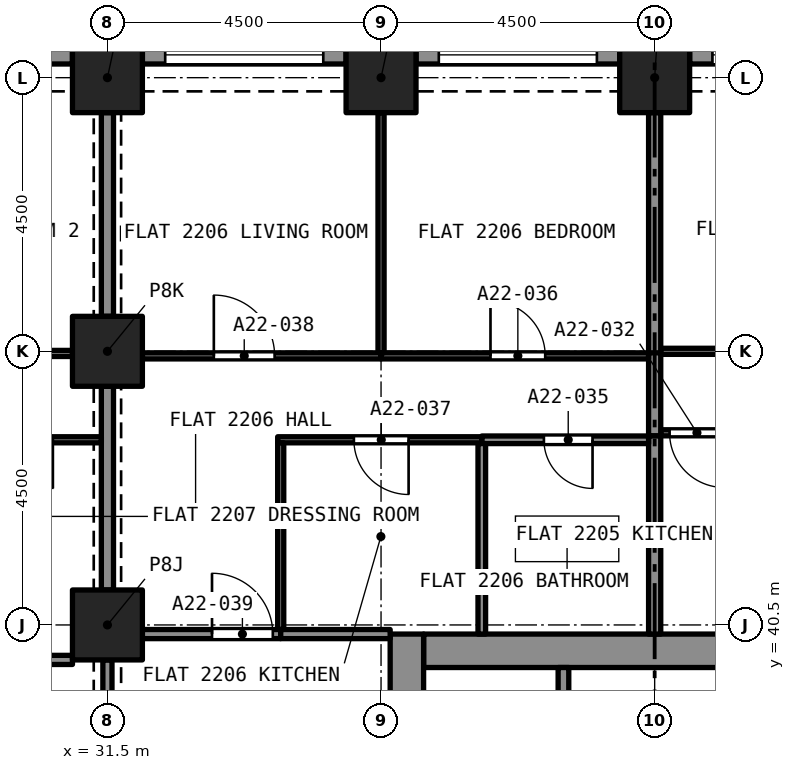
"""IFC4 building model, lengths in metres.
Left out: names, types, materials, properties, quantities, classifications, styles, units other than length and angle.
Written with IfcOpenShell. Run it as: python <this file> out.ifc"""

import sys

from ifc_helpers import new_model, si_unit, direction, frame, frame_2d, origin, origin_2d, place, context, subcontext, project, spatial, rectangle, extrude, element, fill, save


model = new_model("IFC4")
c1 = context("Model", 3, precision=1e-05, world=origin(), true_north=direction((0.0, 1.0)))
c2 = subcontext(c1, "Body", "Model", "MODEL_VIEW")
j1 = project(units=[si_unit("LENGTHUNIT", "METRE"), si_unit("PLANEANGLEUNIT", "RADIAN")], contexts=[c1])
p1 = place(None, origin())
s1 = spatial("IfcSite", under=j1, at=p1, CompositionType="ELEMENT")
p2 = place(p1, origin())
s2 = spatial("IfcBuilding", under=s1, at=p2, CompositionType="ELEMENT")
p3 = place(p2, frame((0.0, 0.0, 83.2)))
s3 = spatial("IfcBuildingStorey", under=s2, at=p3, CompositionType="ELEMENT", Elevation=83.2)
for number, where, z_axis, x_axis in (
    (1, (31.5, 40.5, 0.0), (0.0, 0.0, 1.0), (1.0, 0.0, 0.0)),
    (2, (31.5, 45.0, 0.0), (0.0, 0.0, 1.0), (1.0, 0.0, 0.0)),
    (3, (31.5, 49.5, 0.0), (0.0, 0.0, 1.0), (1.0, 0.0, 0.0)),
    (4, (36.0, 49.5, 0.0), (0.0, 0.0, 1.0), (1.0, 0.0, 0.0)),
    (5, (40.5, 49.5, 0.0), (0.0, 0.0, 1.0), (1.0, 0.0, 0.0)),
):
    element("IfcColumn", number, at=place(p3, frame(where, z_axis=z_axis, x_axis=x_axis)), inside=s3, PredefinedType="COLUMN", context=c2, shape_type="SweptSolid", body=[
        extrude(rectangle(XDim=1.15, YDim=1.15, at=origin_2d()), origin(), (0.0, 0.0, 1.0), 3.2),
    ])
p4 = place(p3, frame((36.7, 40.075, 0.0), z_axis=(0.0, 0.0, 1.0), x_axis=(1.0, 0.0, 0.0)))
e6 = element("IfcWall", 6, at=p4, inside=s3, PredefinedType="SOLIDWALL", context=c2, shape_type="SweptSolid", body=[
    extrude(rectangle(XDim=7.6, YDim=0.55, at=frame_2d((3.8, 0.0))), origin(), (0.0, 0.0, 1.0), 3.2),
])
p5 = place(p3, frame((36.425, 27.15, 0.0), z_axis=(0.0, 0.0, 1.0), x_axis=(0.0, 1.0, 0.0)))
e7 = element("IfcWall", 7, at=p5, inside=s3, PredefinedType="SOLIDWALL", context=c2, shape_type="SweptSolid", body=[
    extrude(rectangle(XDim=13.2, YDim=0.55, at=frame_2d((6.6, 0.0))), origin(), (0.0, 0.0, 1.0), 3.2),
])
p6 = place(p5, frame((8.8, 0.0, 0.0)))
e8 = element("IfcOpeningElement", 8, at=p6, cuts=e7, PredefinedType="OPENING", context=c2, shape_type="SweptSolid", body=[
    extrude(rectangle(XDim=1.2, YDim=2.1, at=frame_2d((0.6, 1.05))), frame((0.0, 0.285, 0.0), z_axis=(0.0, -1.0, 0.0), x_axis=(1.0, 0.0, 0.0)), (0.0, 0.0, 1.0), 0.57),
])
p7 = place(p3, frame((41.075, 49.875, 0.0), z_axis=(0.0, 0.0, 1.0), x_axis=(1.0, 0.0, 0.0)))
e9 = element("IfcWall", 9, at=p7, inside=s3, PredefinedType="SOLIDWALL", context=c2, shape_type="SweptSolid", body=[
    extrude(rectangle(XDim=3.35, YDim=0.3, at=frame_2d((1.675, 0.0))), origin(), (0.0, 0.0, 1.0), 3.2),
])
p8 = place(p7, frame((0.375, 0.0, 0.45)))
e10 = element("IfcOpeningElement", 10, at=p8, cuts=e9, PredefinedType="OPENING", context=c2, shape_type="SweptSolid", body=[
    extrude(rectangle(XDim=2.6, YDim=1.95, at=frame_2d((1.3, 0.975))), frame((0.0, 0.16, 0.0), z_axis=(0.0, -1.0, 0.0), x_axis=(1.0, 0.0, 0.0)), (0.0, 0.0, 1.0), 0.32),
])
p9 = place(p3, frame((36.575, 49.875, 0.0), z_axis=(0.0, 0.0, 1.0), x_axis=(1.0, 0.0, 0.0)))
e11 = element("IfcWall", 11, at=p9, inside=s3, PredefinedType="SOLIDWALL", context=c2, shape_type="SweptSolid", body=[
    extrude(rectangle(XDim=3.35, YDim=0.3, at=frame_2d((1.675, 0.0))), origin(), (0.0, 0.0, 1.0), 3.2),
])
p10 = place(p9, frame((0.375, 0.0, 0.45)))
e12 = element("IfcOpeningElement", 12, at=p10, cuts=e11, PredefinedType="OPENING", context=c2, shape_type="SweptSolid", body=[
    extrude(rectangle(XDim=2.6, YDim=1.95, at=frame_2d((1.3, 0.975))), frame((0.0, 0.16, 0.0), z_axis=(0.0, -1.0, 0.0), x_axis=(1.0, 0.0, 0.0)), (0.0, 0.0, 1.0), 0.32),
])
p11 = place(p3, frame((32.075, 49.875, 0.0), z_axis=(0.0, 0.0, 1.0), x_axis=(1.0, 0.0, 0.0)))
e13 = element("IfcWall", 13, at=p11, inside=s3, PredefinedType="SOLIDWALL", context=c2, shape_type="SweptSolid", body=[
    extrude(rectangle(XDim=3.35, YDim=0.3, at=frame_2d((1.675, 0.0))), origin(), (0.0, 0.0, 1.0), 3.2),
])
p12 = place(p11, frame((0.375, 0.0, 0.45)))
e14 = element("IfcOpeningElement", 14, at=p12, cuts=e13, PredefinedType="OPENING", context=c2, shape_type="SweptSolid", body=[
    extrude(rectangle(XDim=2.6, YDim=1.95, at=frame_2d((1.3, 0.975))), frame((0.0, 0.16, 0.0), z_axis=(0.0, -1.0, 0.0), x_axis=(1.0, 0.0, 0.0)), (0.0, 0.0, 1.0), 0.32),
])
p13 = place(p3, frame((27.575, 49.875, 0.0), z_axis=(0.0, 0.0, 1.0), x_axis=(1.0, 0.0, 0.0)))
e15 = element("IfcWall", 15, at=p13, inside=s3, PredefinedType="SOLIDWALL", context=c2, shape_type="SweptSolid", body=[
    extrude(rectangle(XDim=3.35, YDim=0.3, at=frame_2d((1.675, 0.0))), origin(), (0.0, 0.0, 1.0), 3.2),
])
p14 = place(p13, frame((0.375, 0.0, 0.45)))
e16 = element("IfcOpeningElement", 16, at=p14, cuts=e15, PredefinedType="OPENING", context=c2, shape_type="SweptSolid", body=[
    extrude(rectangle(XDim=2.6, YDim=1.95, at=frame_2d((1.3, 0.975))), frame((0.0, 0.16, 0.0), z_axis=(0.0, -1.0, 0.0), x_axis=(1.0, 0.0, 0.0)), (0.0, 0.0, 1.0), 0.32),
])
p15 = place(p3, frame((40.6, 45.0, 0.0), z_axis=(0.0, 0.0, 1.0), x_axis=(1.0, 0.0, 0.0)))
e17 = element("IfcWall", 17, at=p15, inside=s3, PredefinedType="PARTITIONING", context=c2, shape_type="SweptSolid", body=[
    extrude(rectangle(XDim=4.4, YDim=0.1, at=frame_2d((2.2, 0.0))), origin(), (0.0, 0.0, 1.0), 2.9),
])
p16 = place(p15, frame((1.7, 0.0, 0.0)))
e18 = element("IfcOpeningElement", 18, at=p16, cuts=e17, PredefinedType="OPENING", context=c2, shape_type="SweptSolid", body=[
    extrude(rectangle(XDim=0.9, YDim=2.1, at=frame_2d((0.45, 1.05))), frame((0.0, 0.06, 0.0), z_axis=(0.0, -1.0, 0.0), x_axis=(1.0, 0.0, 0.0)), (0.0, 0.0, 1.0), 0.12),
])
p17 = place(p3, frame((40.5, 44.95, 0.0), z_axis=(0.0, 0.0, 1.0), x_axis=(0.0, 1.0, 0.0)))
e19 = element("IfcWall", 19, at=p17, inside=s3, PredefinedType="PARTITIONING", context=c2, shape_type="SweptSolid", body=[
    extrude(rectangle(XDim=3.975, YDim=0.2, at=frame_2d((1.988, 0.0))), origin(), (0.0, 0.0, 1.0), 2.9),
])
p18 = place(p3, frame((41.891, 43.66, 0.0), z_axis=(0.0, 0.0, 1.0), x_axis=(-1.0, 0.0, 0.0)))
e20 = element("IfcWall", 20, at=p18, inside=s3, PredefinedType="PARTITIONING", context=c2, shape_type="SweptSolid", body=[
    extrude(rectangle(XDim=1.291, YDim=0.1, at=frame_2d((0.646, 0.0))), origin(), (0.0, 0.0, 1.0), 2.9),
])
p19 = place(p18, frame((0.246, 0.0, 0.0)))
e21 = element("IfcOpeningElement", 21, at=p19, cuts=e20, PredefinedType="OPENING", context=c2, shape_type="SweptSolid", body=[
    extrude(rectangle(XDim=0.9, YDim=2.1, at=frame_2d((0.45, 1.05))), frame((0.0, 0.06, 0.0), z_axis=(0.0, -1.0, 0.0), x_axis=(1.0, 0.0, 0.0)), (0.0, 0.0, 1.0), 0.12),
])
p20 = place(p3, frame((40.5, 43.61, 0.0), z_axis=(0.0, 0.0, 1.0), x_axis=(0.0, 1.0, 0.0)))
e22 = element("IfcWall", 22, at=p20, inside=s3, PredefinedType="PARTITIONING", context=c2, shape_type="SweptSolid", body=[
    extrude(rectangle(XDim=1.365, YDim=0.2, at=frame_2d((0.683, 0.0))), origin(), (0.0, 0.0, 1.0), 2.9),
])
p21 = place(p3, frame((40.5, 40.35, 0.0), z_axis=(0.0, 0.0, 1.0), x_axis=(0.0, 1.0, 0.0)))
e23 = element("IfcWall", 23, at=p21, inside=s3, PredefinedType="PARTITIONING", context=c2, shape_type="SweptSolid", body=[
    extrude(rectangle(XDim=3.257, YDim=0.2, at=frame_2d((1.629, 0.0))), origin(), (0.0, 0.0, 1.0), 2.9),
])
p22 = place(p3, frame((40.4, 43.545, 0.0), z_axis=(0.0, 0.0, 1.0), x_axis=(-1.0, 0.0, 0.0)))
e24 = element("IfcWall", 24, at=p22, inside=s3, PredefinedType="PARTITIONING", context=c2, shape_type="SweptSolid", body=[
    extrude(rectangle(XDim=2.743, YDim=0.125, at=frame_2d((1.372, 0.0))), origin(), (0.0, 0.0, 1.0), 2.9),
])
p23 = place(p22, frame((0.922, 0.0, 0.0)))
e25 = element("IfcOpeningElement", 25, at=p23, cuts=e24, PredefinedType="OPENING", context=c2, shape_type="SweptSolid", body=[
    extrude(rectangle(XDim=0.8, YDim=2.1, at=frame_2d((0.4, 1.05))), frame((0.0, 0.073, 0.0), z_axis=(0.0, -1.0, 0.0), x_axis=(1.0, 0.0, 0.0)), (0.0, 0.0, 1.0), 0.145),
])
p24 = place(p3, frame((37.657, 40.35, 0.0), z_axis=(0.0, 0.0, 1.0), x_axis=(0.0, 1.0, 0.0)))
e26 = element("IfcWall", 26, at=p24, inside=s3, PredefinedType="PARTITIONING", context=c2, shape_type="SweptSolid", body=[
    extrude(rectangle(XDim=3.132, YDim=0.125, at=frame_2d((1.566, 0.0))), origin(), (0.0, 0.0, 1.0), 2.9),
])
p25 = place(p3, frame((36.0, 44.925, 0.0), z_axis=(0.0, 0.0, 1.0), x_axis=(1.0, 0.0, 0.0)))
e27 = element("IfcWall", 27, at=p25, inside=s3, PredefinedType="PARTITIONING", context=c2, shape_type="SweptSolid", body=[
    extrude(rectangle(XDim=4.4, YDim=0.1, at=frame_2d((2.2, 0.0))), origin(), (0.0, 0.0, 1.0), 2.9),
])
p26 = place(p25, frame((1.8, 0.0, 0.0)))
e28 = element("IfcOpeningElement", 28, at=p26, cuts=e27, PredefinedType="OPENING", context=c2, shape_type="SweptSolid", body=[
    extrude(rectangle(XDim=0.9, YDim=2.1, at=frame_2d((0.45, 1.05))), frame((0.0, 0.06, 0.0), z_axis=(0.0, -1.0, 0.0), x_axis=(1.0, 0.0, 0.0)), (0.0, 0.0, 1.0), 0.12),
])
p27 = place(p3, frame((36.0, 44.975, 0.0), z_axis=(0.0, 0.0, 1.0), x_axis=(0.0, 1.0, 0.0)))
e29 = element("IfcWall", 29, at=p27, inside=s3, PredefinedType="PARTITIONING", context=c2, shape_type="SweptSolid", body=[
    extrude(rectangle(XDim=3.95, YDim=0.1, at=frame_2d((1.975, 0.0))), origin(), (0.0, 0.0, 1.0), 2.9),
])
p28 = place(p3, frame((37.657, 43.545, 0.0), z_axis=(0.0, 0.0, 1.0), x_axis=(-1.0, 0.0, 0.0)))
e30 = element("IfcWall", 30, at=p28, inside=s3, PredefinedType="PARTITIONING", context=c2, shape_type="SweptSolid", body=[
    extrude(rectangle(XDim=3.357, YDim=0.1, at=frame_2d((1.678, 0.0))), origin(), (0.0, 0.0, 1.0), 2.9),
])
p29 = place(p28, frame((1.203, 0.0, 0.0)))
e31 = element("IfcOpeningElement", 31, at=p29, cuts=e30, PredefinedType="OPENING", context=c2, shape_type="SweptSolid", body=[
    extrude(rectangle(XDim=0.9, YDim=2.1, at=frame_2d((0.45, 1.05))), frame((0.0, 0.06, 0.0), z_axis=(0.0, -1.0, 0.0), x_axis=(1.0, 0.0, 0.0)), (0.0, 0.0, 1.0), 0.12),
])
p30 = place(p3, frame((34.35, 40.425, 0.0), z_axis=(0.0, 0.0, 1.0), x_axis=(0.0, 1.0, 0.0)))
e32 = element("IfcWall", 32, at=p30, inside=s3, PredefinedType="PARTITIONING", context=c2, shape_type="SweptSolid", body=[
    extrude(rectangle(XDim=3.07, YDim=0.1, at=frame_2d((1.535, 0.0))), origin(), (0.0, 0.0, 1.0), 2.9),
])
p31 = place(p3, frame((32.075, 44.925, 0.0), z_axis=(0.0, 0.0, 1.0), x_axis=(1.0, 0.0, 0.0)))
e33 = element("IfcWall", 33, at=p31, inside=s3, PredefinedType="PARTITIONING", context=c2, shape_type="SweptSolid", body=[
    extrude(rectangle(XDim=3.925, YDim=0.1, at=frame_2d((1.962, 0.0))), origin(), (0.0, 0.0, 1.0), 2.9),
])
p32 = place(p31, frame((1.175, 0.0, 0.0)))
e34 = element("IfcOpeningElement", 34, at=p32, cuts=e33, PredefinedType="OPENING", context=c2, shape_type="SweptSolid", body=[
    extrude(rectangle(XDim=1.0, YDim=2.1, at=frame_2d((0.5, 1.05))), frame((0.0, 0.06, 0.0), z_axis=(0.0, -1.0, 0.0), x_axis=(1.0, 0.0, 0.0)), (0.0, 0.0, 1.0), 0.12),
])
p33 = place(p3, frame((31.5, 41.075, 0.0), z_axis=(0.0, 0.0, 1.0), x_axis=(0.0, 1.0, 0.0)))
e35 = element("IfcWall", 35, at=p33, inside=s3, PredefinedType="PARTITIONING", context=c2, shape_type="SweptSolid", body=[
    extrude(rectangle(XDim=3.35, YDim=0.2, at=frame_2d((1.675, 0.0))), origin(), (0.0, 0.0, 1.0), 2.38),
])
p34 = place(p3, frame((32.075, 40.35, 0.0), z_axis=(0.0, 0.0, 1.0), x_axis=(1.0, 0.0, 0.0)))
e36 = element("IfcWall", 36, at=p34, inside=s3, PredefinedType="PARTITIONING", context=c2, shape_type="SweptSolid", body=[
    extrude(rectangle(XDim=2.275, YDim=0.15, at=frame_2d((1.138, 0.0))), origin(), (0.0, 0.0, 1.0), 2.9),
])
p35 = place(p34, frame((1.145, 0.0, 0.0)))
e37 = element("IfcOpeningElement", 37, at=p35, cuts=e36, PredefinedType="OPENING", context=c2, shape_type="SweptSolid", body=[
    extrude(rectangle(XDim=1.0, YDim=2.1, at=frame_2d((0.5, 1.05))), frame((0.0, 0.085, 0.0), z_axis=(0.0, -1.0, 0.0), x_axis=(1.0, 0.0, 0.0)), (0.0, 0.0, 1.0), 0.17),
])
p36 = place(p3, frame((34.35, 40.35, 0.0), z_axis=(0.0, 0.0, 1.0), x_axis=(1.0, 0.0, 0.0)))
e38 = element("IfcWall", 38, at=p36, inside=s3, PredefinedType="PARTITIONING", context=c2, shape_type="SweptSolid", body=[
    extrude(rectangle(XDim=1.8, YDim=0.15, at=frame_2d((0.9, 0.0))), origin(), (0.0, 0.0, 1.0), 2.9),
])
p37 = place(p3, frame((31.5, 45.575, 0.0), z_axis=(0.0, 0.0, 1.0), x_axis=(0.0, 1.0, 0.0)))
e39 = element("IfcWall", 39, at=p37, inside=s3, PredefinedType="PARTITIONING", context=c2, shape_type="SweptSolid", body=[
    extrude(rectangle(XDim=3.35, YDim=0.2, at=frame_2d((1.675, 0.0))), origin(), (0.0, 0.0, 1.0), 2.38),
])
p38 = place(p3, frame((25.35, 39.925, 0.0), z_axis=(0.0, 0.0, 1.0), x_axis=(1.0, 0.0, 0.0)))
e40 = element("IfcWall", 40, at=p38, inside=s3, PredefinedType="PARTITIONING", context=c2, shape_type="SweptSolid", body=[
    extrude(rectangle(XDim=5.575, YDim=0.15, at=frame_2d((2.788, 0.0))), origin(), (0.0, 0.0, 1.0), 2.75),
])
p39 = place(p3, frame((27.0, 44.965, 0.0), z_axis=(0.0, 0.0, 1.0), x_axis=(1.0, 0.0, 0.0)))
e41 = element("IfcWall", 41, at=p39, inside=s3, PredefinedType="PARTITIONING", context=c2, shape_type="SweptSolid", body=[
    extrude(rectangle(XDim=3.925, YDim=0.1, at=frame_2d((1.962, 0.0))), origin(), (0.0, 0.0, 1.0), 2.75),
])
p40 = place(p39, frame((1.8, 0.0, 0.0)))
e42 = element("IfcOpeningElement", 42, at=p40, cuts=e41, PredefinedType="OPENING", context=c2, shape_type="SweptSolid", body=[
    extrude(rectangle(XDim=0.9, YDim=2.1, at=frame_2d((0.45, 1.05))), frame((0.0, 0.06, 0.0), z_axis=(0.0, -1.0, 0.0), x_axis=(1.0, 0.0, 0.0)), (0.0, 0.0, 1.0), 0.12),
])
p41 = place(p3, frame((31.4, 43.545, 0.0), z_axis=(0.0, 0.0, 1.0), x_axis=(-1.0, 0.0, 0.0)))
e43 = element("IfcWall", 43, at=p41, inside=s3, PredefinedType="PARTITIONING", context=c2, shape_type="SweptSolid", body=[
    extrude(rectangle(XDim=2.494, YDim=0.1, at=frame_2d((1.247, 0.0))), origin(), (0.0, 0.0, 1.0), 2.75),
])
p42 = place(p41, frame((0.797, 0.0, 0.0)))
e44 = element("IfcOpeningElement", 44, at=p42, cuts=e43, PredefinedType="OPENING", context=c2, shape_type="SweptSolid", body=[
    extrude(rectangle(XDim=0.8, YDim=2.1, at=frame_2d((0.4, 1.05))), frame((0.0, 0.06, 0.0), z_axis=(0.0, -1.0, 0.0), x_axis=(1.0, 0.0, 0.0)), (0.0, 0.0, 1.0), 0.12),
])
p43 = place(p3, frame((31.5, 36.575, 0.0), z_axis=(0.0, 0.0, 1.0), x_axis=(0.0, 1.0, 0.0)))
e45 = element("IfcWall", 45, at=p43, inside=s3, PredefinedType="PARTITIONING", context=c2, shape_type="SweptSolid", body=[
    extrude(rectangle(XDim=3.35, YDim=0.15, at=frame_2d((1.675, 0.0))), origin(), (0.0, 0.0, 1.0), 2.38),
])
p44 = place(p43, frame((1.075, 0.0, 0.0)))
e46 = element("IfcOpeningElement", 46, at=p44, cuts=e45, PredefinedType="OPENING", context=c2, shape_type="SweptSolid", body=[
    extrude(rectangle(XDim=1.2, YDim=2.1, at=frame_2d((0.6, 1.05))), frame((0.0, 0.085, 0.0), z_axis=(0.0, -1.0, 0.0), x_axis=(1.0, 0.0, 0.0)), (0.0, 0.0, 1.0), 0.17),
])
p45 = place(p3, frame((39.0, 37.5, 0.0), z_axis=(0.0, 0.0, 1.0), x_axis=(0.0, 1.0, 0.0)))
e47 = element("IfcWall", 47, at=p45, inside=s3, PredefinedType="SOLIDWALL", context=c2, shape_type="SweptSolid", body=[
    extrude(rectangle(XDim=2.3, YDim=0.175, at=frame_2d((1.15, 0.0))), origin(), (0.0, 0.0, 1.0), 2.9),
])
p46 = place(p8, origin())
e48 = element("IfcWindow", 48, at=p46, inside=s3, PartitioningType="SINGLE_PANEL", PredefinedType="WINDOW", context=c2, shape_type="SweptSolid", body=[
    extrude(rectangle(XDim=2.6, YDim=1.95, at=frame_2d((1.3, 0.975))), frame((0.0, 0.03, 0.0), z_axis=(0.0, -1.0, 0.0), x_axis=(1.0, 0.0, 0.0)), (0.0, 0.0, 1.0), 0.06),
])
fill(e10, e48)
p47 = place(p10, origin())
e49 = element("IfcWindow", 49, at=p47, inside=s3, PartitioningType="SINGLE_PANEL", PredefinedType="WINDOW", context=c2, shape_type="SweptSolid", body=[
    extrude(rectangle(XDim=2.6, YDim=1.95, at=frame_2d((1.3, 0.975))), frame((0.0, 0.03, 0.0), z_axis=(0.0, -1.0, 0.0), x_axis=(1.0, 0.0, 0.0)), (0.0, 0.0, 1.0), 0.06),
])
fill(e12, e49)
p48 = place(p12, origin())
e50 = element("IfcWindow", 50, at=p48, inside=s3, PartitioningType="SINGLE_PANEL", PredefinedType="WINDOW", context=c2, shape_type="SweptSolid", body=[
    extrude(rectangle(XDim=2.6, YDim=1.95, at=frame_2d((1.3, 0.975))), frame((0.0, 0.03, 0.0), z_axis=(0.0, -1.0, 0.0), x_axis=(1.0, 0.0, 0.0)), (0.0, 0.0, 1.0), 0.06),
])
fill(e14, e50)
p49 = place(p19, origin())
e51 = element("IfcDoor", 51, at=p49, inside=s3, OperationType="SINGLE_SWING_RIGHT", PredefinedType="DOOR", context=c2, shape_type="SweptSolid", body=[
    extrude(rectangle(XDim=0.9, YDim=2.1, at=frame_2d((0.45, 1.05))), frame((0.0, 0.025, 0.0), z_axis=(0.0, -1.0, 0.0), x_axis=(1.0, 0.0, 0.0)), (0.0, 0.0, 1.0), 0.05),
])
fill(e21, e51)
p50 = place(p23, origin())
e52 = element("IfcDoor", 52, at=p50, inside=s3, OperationType="SINGLE_SWING_LEFT", PredefinedType="DOOR", context=c2, shape_type="SweptSolid", body=[
    extrude(rectangle(XDim=0.8, YDim=2.1, at=frame_2d((0.4, 1.05))), frame((0.0, 0.025, 0.0), z_axis=(0.0, -1.0, 0.0), x_axis=(1.0, 0.0, 0.0)), (0.0, 0.0, 1.0), 0.05),
])
fill(e25, e52)
p51 = place(p26, origin())
e53 = element("IfcDoor", 53, at=p51, inside=s3, OperationType="SINGLE_SWING_RIGHT", PredefinedType="DOOR", context=c2, shape_type="SweptSolid", body=[
    extrude(rectangle(XDim=0.9, YDim=2.1, at=frame_2d((0.45, 1.05))), frame((0.0, 0.025, 0.0), z_axis=(0.0, -1.0, 0.0), x_axis=(1.0, 0.0, 0.0)), (0.0, 0.0, 1.0), 0.05),
])
fill(e28, e53)
p52 = place(p29, origin())
e54 = element("IfcDoor", 54, at=p52, inside=s3, OperationType="SINGLE_SWING_LEFT", PredefinedType="DOOR", context=c2, shape_type="SweptSolid", body=[
    extrude(rectangle(XDim=0.9, YDim=2.1, at=frame_2d((0.45, 1.05))), frame((0.0, 0.025, 0.0), z_axis=(0.0, -1.0, 0.0), x_axis=(1.0, 0.0, 0.0)), (0.0, 0.0, 1.0), 0.05),
])
fill(e31, e54)
p53 = place(p32, origin())
e55 = element("IfcDoor", 55, at=p53, inside=s3, OperationType="SINGLE_SWING_LEFT", PredefinedType="DOOR", context=c2, shape_type="SweptSolid", body=[
    extrude(rectangle(XDim=1.0, YDim=2.1, at=frame_2d((0.5, 1.05))), frame((0.0, 0.025, 0.0), z_axis=(0.0, -1.0, 0.0), x_axis=(1.0, 0.0, 0.0)), (0.0, 0.0, 1.0), 0.05),
])
fill(e34, e55)
p54 = place(p35, origin())
e56 = element("IfcDoor", 56, at=p54, inside=s3, OperationType="SINGLE_SWING_RIGHT", PredefinedType="DOOR", context=c2, shape_type="SweptSolid", body=[
    extrude(rectangle(XDim=1.0, YDim=2.1, at=frame_2d((0.5, 1.05))), frame((0.0, 0.025, 0.0), z_axis=(0.0, -1.0, 0.0), x_axis=(1.0, 0.0, 0.0)), (0.0, 0.0, 1.0), 0.05),
])
fill(e37, e56)
p55 = place(p42, origin())
e57 = element("IfcDoor", 57, at=p55, inside=s3, OperationType="SINGLE_SWING_LEFT", PredefinedType="DOOR", context=c2, shape_type="SweptSolid", body=[
    extrude(rectangle(XDim=0.8, YDim=2.1, at=frame_2d((0.4, 1.05))), frame((0.0, 0.025, 0.0), z_axis=(0.0, -1.0, 0.0), x_axis=(1.0, 0.0, 0.0)), (0.0, 0.0, 1.0), 0.05),
])
fill(e44, e57)
save(model, sys.argv[1])
